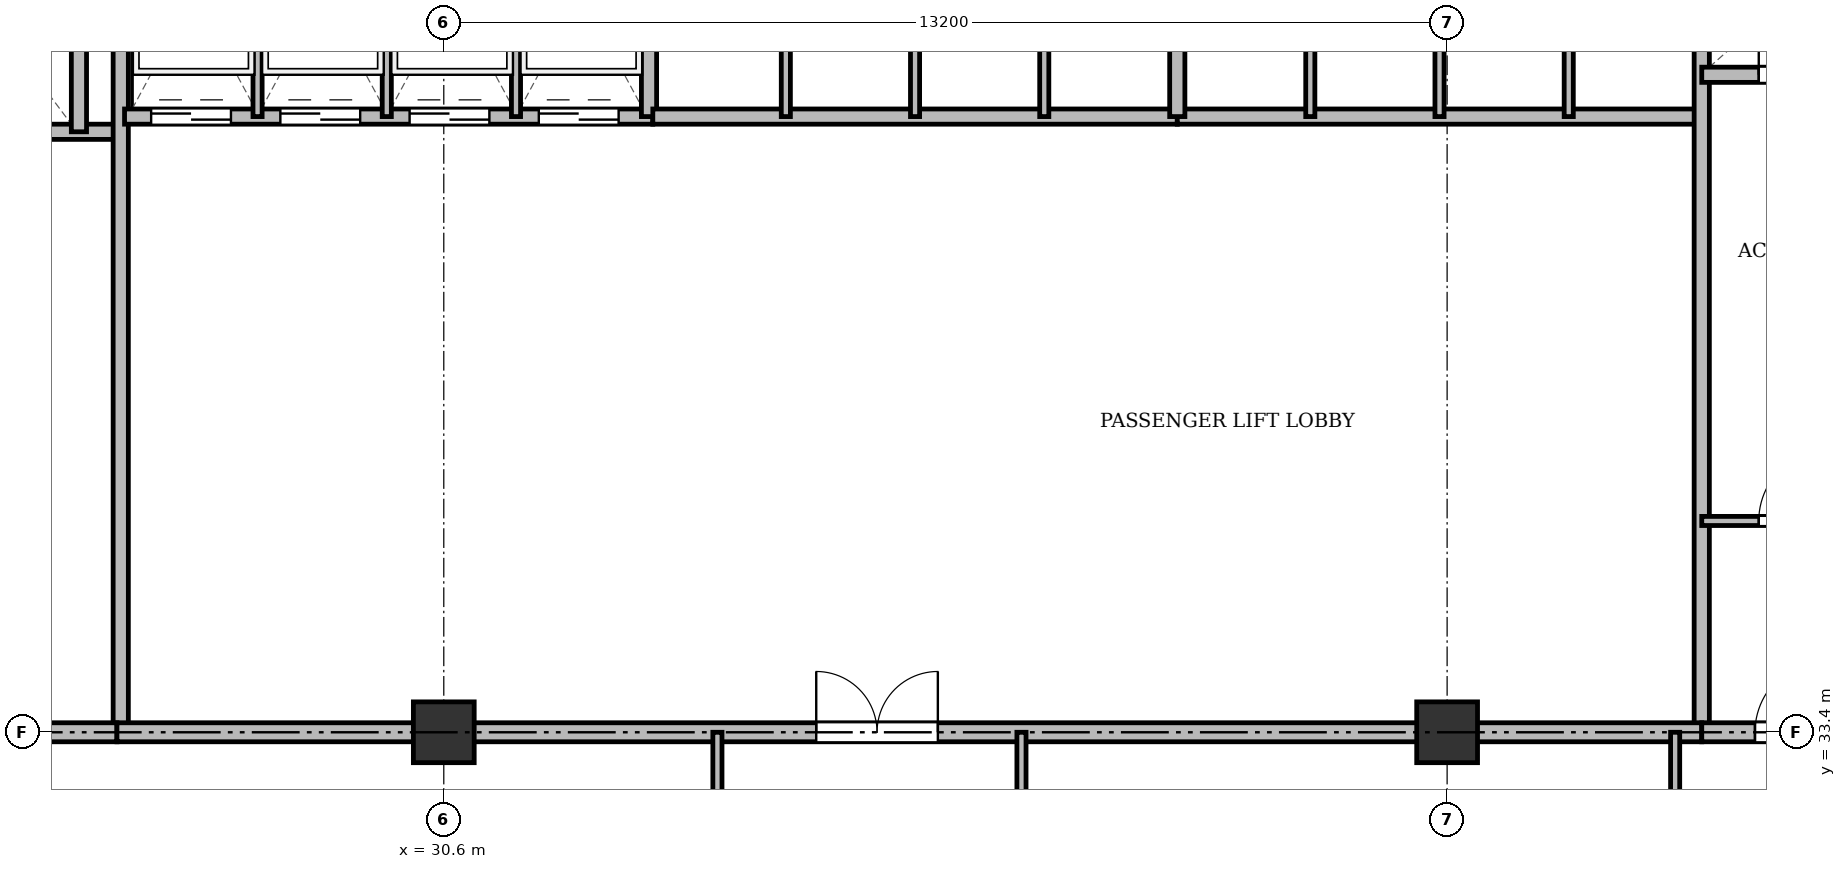
"""IFC4 building model, lengths in metres.
Left out: names, types, materials, properties, quantities, classifications, styles, units other than length and angle.
Written with IfcOpenShell. Run it as: python <this file> out.ifc"""

import sys

from ifc_helpers import new_model, si_unit, direction, frame, frame_2d, origin, origin_2d, place, context, subcontext, project, spatial, rectangle, extrude, source, transform, mapped, element, fill, save


model = new_model("IFC4")
c1 = context("Model", 3, precision=1e-05, world=origin(), true_north=direction((0.0, 1.0)))
c2 = subcontext(c1, "Body", "Model", "MODEL_VIEW")
j1 = project(units=[si_unit("LENGTHUNIT", "METRE"), si_unit("PLANEANGLEUNIT", "RADIAN")], contexts=[c1])
p1 = place(None, origin())
s1 = spatial("IfcSite", under=j1, at=p1, CompositionType="ELEMENT")
p2 = place(p1, origin())
s2 = spatial("IfcBuilding", under=s1, at=p2, CompositionType="ELEMENT")
p3 = place(p2, frame((0.0, 0.0, 114.1)))
s3 = spatial("IfcBuildingStorey", under=s2, at=p3, CompositionType="ELEMENT", Elevation=114.1)
m1 = source(origin(), c2, "Body", "SweptSolid", [
    extrude(rectangle(XDim=0.8, YDim=0.8, at=origin_2d()), origin(), (0.0, 0.0, 1.0), 3.6),
])
for number, where, z_axis, x_axis in (
    (1, (30.6, 33.4, 0.0), (0.0, 0.0, 1.0), (1.0, 0.0, 0.0)),
    (2, (43.8, 33.4, 0.0), (0.0, 0.0, 1.0), (1.0, 0.0, 0.0)),
):
    element("IfcColumn", number, at=place(p3, frame(where, z_axis=z_axis, x_axis=x_axis)), inside=s3, PredefinedType="COLUMN", context=c2, shape_type="MappedRepresentation", body=[
        mapped(m1, transform((0.0, 0.0, 0.0), x_axis=(1.0, 0.0, 0.0), y_axis=(0.0, 1.0, 0.0), z_axis=(0.0, 0.0, 1.0), scale=1.0)),
    ])
p4 = place(p3, frame((19.55, 41.3, 0.0), z_axis=(0.0, 0.0, 1.0), x_axis=(1.0, 0.0, 0.0)))
e3 = element("IfcWall", 3, at=p4, inside=s3, PredefinedType="SOLIDWALL", context=c2, shape_type="SweptSolid", body=[
    extrude(rectangle(XDim=6.75, YDim=0.2, at=frame_2d((3.375, 0.0))), origin(), (0.0, 0.0, 1.0), 3.34),
])
p5 = place(p4, frame((1.7, 0.0, 0.0)))
e4 = element("IfcOpeningElement", 4, at=p5, cuts=e3, PredefinedType="OPENING", context=c2, shape_type="SweptSolid", body=[
    extrude(rectangle(XDim=1.1, YDim=2.15, at=frame_2d((0.55, 1.075))), frame((0.0, 0.11, 0.0), z_axis=(0.0, -1.0, 0.0), x_axis=(1.0, 0.0, 0.0)), (0.0, 0.0, 1.0), 0.22),
])
p6 = place(p4, frame((4.4, 0.0, 0.0)))
e5 = element("IfcOpeningElement", 5, at=p6, cuts=e3, PredefinedType="OPENING", context=c2, shape_type="SweptSolid", body=[
    extrude(rectangle(XDim=1.1, YDim=2.15, at=frame_2d((0.55, 1.075))), frame((0.0, 0.11, 0.0), z_axis=(0.0, -1.0, 0.0), x_axis=(1.0, 0.0, 0.0)), (0.0, 0.0, 1.0), 0.22),
])
p7 = place(p3, frame((25.8, 41.3, 0.0), z_axis=(0.0, 0.0, 1.0), x_axis=(0.0, 1.0, 0.0)))
e6 = element("IfcWall", 6, at=p7, inside=s3, PredefinedType="SOLIDWALL", context=c2, shape_type="SweptSolid", body=[
    extrude(rectangle(XDim=3.4, YDim=0.2, at=frame_2d((1.7, 0.0))), origin(), (0.0, 0.0, 1.0), 3.34),
])
p8 = place(p3, frame((26.35, 33.4, 0.0), z_axis=(0.0, 0.0, 1.0), x_axis=(0.0, 1.0, 0.0)))
e7 = element("IfcWall", 7, at=p8, inside=s3, PredefinedType="SOLIDWALL", context=c2, shape_type="SweptSolid", body=[
    extrude(rectangle(XDim=11.3, YDim=0.2, at=frame_2d((5.65, 0.0))), origin(), (0.0, 0.0, 1.0), 2.752),
])
p9 = place(p3, frame((19.5, 33.4, 0.0), z_axis=(0.0, 0.0, 1.0), x_axis=(1.0, 0.0, 0.0)))
e8 = element("IfcWall", 8, at=p9, inside=s3, PredefinedType="PARTITIONING", context=c2, shape_type="SweptSolid", body=[
    extrude(rectangle(XDim=6.8, YDim=0.25, at=frame_2d((3.4, 0.0))), origin(), (0.0, 0.0, 1.0), 2.752),
])
p10 = place(p9, frame((0.75, 0.0, 0.0)))
e9 = element("IfcOpeningElement", 9, at=p10, cuts=e8, PredefinedType="OPENING", context=c2, shape_type="SweptSolid", body=[
    extrude(rectangle(XDim=1.6, YDim=2.2, at=frame_2d((0.8, 1.1))), frame((0.0, 0.135, 0.0), z_axis=(0.0, -1.0, 0.0), x_axis=(1.0, 0.0, 0.0)), (0.0, 0.0, 1.0), 0.27),
])
p11 = place(p3, frame((26.4, 41.5, 0.0), z_axis=(0.0, 0.0, 1.0), x_axis=(1.0, 0.0, 0.0)))
e10 = element("IfcWall", 10, at=p11, inside=s3, PredefinedType="SOLIDWALL", context=c2, shape_type="SweptSolid", body=[
    extrude(rectangle(XDim=6.95, YDim=0.2, at=frame_2d((3.475, 0.0))), origin(), (0.0, 0.0, 1.0), 3.34),
])
p12 = place(p11, frame((0.35, 0.0, 0.0)))
e11 = element("IfcOpeningElement", 11, at=p12, cuts=e10, PredefinedType="OPENING", context=c2, shape_type="SweptSolid", body=[
    extrude(rectangle(XDim=1.05, YDim=2.15, at=frame_2d((0.525, 1.075))), frame((0.0, 0.11, 0.0), z_axis=(0.0, -1.0, 0.0), x_axis=(1.0, 0.0, 0.0)), (0.0, 0.0, 1.0), 0.22),
])
p13 = place(p11, frame((2.05, 0.0, 0.0)))
e12 = element("IfcOpeningElement", 12, at=p13, cuts=e10, PredefinedType="OPENING", context=c2, shape_type="SweptSolid", body=[
    extrude(rectangle(XDim=1.05, YDim=2.15, at=frame_2d((0.525, 1.075))), frame((0.0, 0.11, 0.0), z_axis=(0.0, -1.0, 0.0), x_axis=(1.0, 0.0, 0.0)), (0.0, 0.0, 1.0), 0.22),
])
p14 = place(p11, frame((3.75, 0.0, 0.0)))
e13 = element("IfcOpeningElement", 13, at=p14, cuts=e10, PredefinedType="OPENING", context=c2, shape_type="SweptSolid", body=[
    extrude(rectangle(XDim=1.05, YDim=2.15, at=frame_2d((0.525, 1.075))), frame((0.0, 0.11, 0.0), z_axis=(0.0, -1.0, 0.0), x_axis=(1.0, 0.0, 0.0)), (0.0, 0.0, 1.0), 0.22),
])
p15 = place(p11, frame((5.45, 0.0, 0.0)))
e14 = element("IfcOpeningElement", 14, at=p15, cuts=e10, PredefinedType="OPENING", context=c2, shape_type="SweptSolid", body=[
    extrude(rectangle(XDim=1.05, YDim=2.15, at=frame_2d((0.525, 1.075))), frame((0.0, 0.11, 0.0), z_axis=(0.0, -1.0, 0.0), x_axis=(1.0, 0.0, 0.0)), (0.0, 0.0, 1.0), 0.22),
])
p16 = place(p3, frame((33.3, 41.5, 0.0), z_axis=(0.0, 0.0, 1.0), x_axis=(0.0, 1.0, 0.0)))
e15 = element("IfcWall", 15, at=p16, inside=s3, PredefinedType="SOLIDWALL", context=c2, shape_type="SweptSolid", body=[
    extrude(rectangle(XDim=3.2, YDim=0.2, at=frame_2d((1.6, 0.0))), origin(), (0.0, 0.0, 1.0), 3.34),
])
for number, where, z_axis, x_axis in (
    (16, (28.15, 41.5, 0.0), (0.0, 0.0, 1.0), (0.0, 1.0, 0.0)),
    (17, (29.85, 41.5, 0.0), (0.0, 0.0, 1.0), (0.0, 1.0, 0.0)),
    (18, (31.55, 41.5, 0.0), (0.0, 0.0, 1.0), (0.0, 1.0, 0.0)),
):
    element("IfcWall", number, at=place(p3, frame(where, z_axis=z_axis, x_axis=x_axis)), inside=s3, PredefinedType="PARTITIONING", context=c2, shape_type="SweptSolid", body=[
        extrude(rectangle(XDim=3.2, YDim=0.12, at=frame_2d((1.6, 0.0))), origin(), (0.0, 0.0, 1.0), 3.34),
    ])
p17 = place(p3, frame((33.35, 41.5, 0.0), z_axis=(0.0, 0.0, 1.0), x_axis=(1.0, 0.0, 0.0)))
e19 = element("IfcWall", 19, at=p17, inside=s3, PredefinedType="SOLIDWALL", context=c2, shape_type="SweptSolid", body=[
    extrude(rectangle(XDim=6.9, YDim=0.2, at=frame_2d((3.45, 0.0))), origin(), (0.0, 0.0, 1.0), 3.34),
])
for number, where, z_axis, x_axis in (
    (20, (35.1, 41.5, 0.0), (0.0, 0.0, 1.0), (0.0, 1.0, 0.0)),
    (21, (36.8, 41.5, 0.0), (0.0, 0.0, 1.0), (0.0, 1.0, 0.0)),
    (22, (38.5, 41.5, 0.0), (0.0, 0.0, 1.0), (0.0, 1.0, 0.0)),
):
    element("IfcWall", number, at=place(p3, frame(where, z_axis=z_axis, x_axis=x_axis)), inside=s3, PredefinedType="PARTITIONING", context=c2, shape_type="SweptSolid", body=[
        extrude(rectangle(XDim=3.2, YDim=0.12, at=frame_2d((1.6, 0.0))), origin(), (0.0, 0.0, 1.0), 3.34),
    ])
p18 = place(p3, frame((40.25, 41.5, 0.0), z_axis=(0.0, 0.0, 1.0), x_axis=(1.0, 0.0, 0.0)))
e23 = element("IfcWall", 23, at=p18, inside=s3, PredefinedType="SOLIDWALL", context=c2, shape_type="SweptSolid", body=[
    extrude(rectangle(XDim=6.9, YDim=0.2, at=frame_2d((3.45, 0.0))), origin(), (0.0, 0.0, 1.0), 2.84),
])
p19 = place(p3, frame((40.25, 41.5, 0.0), z_axis=(0.0, 0.0, 1.0), x_axis=(0.0, 1.0, 0.0)))
e24 = element("IfcWall", 24, at=p19, inside=s3, PredefinedType="SOLIDWALL", context=c2, shape_type="SweptSolid", body=[
    extrude(rectangle(XDim=3.2, YDim=0.2, at=frame_2d((1.6, 0.0))), origin(), (0.0, 0.0, 1.0), 3.34),
])
p20 = place(p3, frame((42.0, 41.5, 0.0), z_axis=(0.0, 0.0, 1.0), x_axis=(0.0, 1.0, 0.0)))
e25 = element("IfcWall", 25, at=p20, inside=s3, PredefinedType="PARTITIONING", context=c2, shape_type="SweptSolid", body=[
    extrude(rectangle(XDim=3.2, YDim=0.12, at=frame_2d((1.6, 0.0))), origin(), (0.0, 0.0, 1.0), 3.34),
])
p21 = place(p3, frame((43.7, 41.5, 0.0), z_axis=(0.0, 0.0, 1.0), x_axis=(0.0, 1.0, 0.0)))
e26 = element("IfcWall", 26, at=p21, inside=s3, PredefinedType="PARTITIONING", context=c2, shape_type="SweptSolid", body=[
    extrude(rectangle(XDim=3.2, YDim=0.12, at=frame_2d((1.6, 0.0))), origin(), (0.0, 0.0, 1.0), 2.84),
])
p22 = place(p3, frame((45.4, 41.5, 0.0), z_axis=(0.0, 0.0, 1.0), x_axis=(0.0, 1.0, 0.0)))
e27 = element("IfcWall", 27, at=p22, inside=s3, PredefinedType="PARTITIONING", context=c2, shape_type="SweptSolid", body=[
    extrude(rectangle(XDim=3.2, YDim=0.12, at=frame_2d((1.6, 0.0))), origin(), (0.0, 0.0, 1.0), 3.34),
])
p23 = place(p3, frame((47.15, 33.4, 0.0), z_axis=(0.0, 0.0, 1.0), x_axis=(0.0, 1.0, 0.0)))
e28 = element("IfcWall", 28, at=p23, inside=s3, PredefinedType="SOLIDWALL", context=c2, shape_type="SweptSolid", body=[
    extrude(rectangle(XDim=11.3, YDim=0.2, at=frame_2d((5.65, 0.0))), origin(), (0.0, 0.0, 1.0), 2.752),
])
p24 = place(p3, frame((26.3, 33.4, 0.0), z_axis=(0.0, 0.0, 1.0), x_axis=(1.0, 0.0, 0.0)))
e29 = element("IfcWall", 29, at=p24, inside=s3, PredefinedType="PARTITIONING", context=c2, shape_type="SweptSolid", body=[
    extrude(rectangle(XDim=20.85, YDim=0.25, at=frame_2d((10.425, 0.0))), origin(), (0.0, 0.0, 1.0), 2.752),
])
p25 = place(p24, frame((9.2, 0.0, 0.0)))
e30 = element("IfcOpeningElement", 30, at=p25, cuts=e29, PredefinedType="OPENING", context=c2, shape_type="SweptSolid", body=[
    extrude(rectangle(XDim=1.6, YDim=2.2, at=frame_2d((0.8, 1.1))), frame((0.0, 0.135, 0.0), z_axis=(0.0, -1.0, 0.0), x_axis=(1.0, 0.0, 0.0)), (0.0, 0.0, 1.0), 0.27),
])
p26 = place(p3, frame((47.15, 42.05, 0.0), z_axis=(0.0, 0.0, 1.0), x_axis=(1.0, 0.0, 0.0)))
e31 = element("IfcWall", 31, at=p26, inside=s3, PredefinedType="SOLIDWALL", context=c2, shape_type="SweptSolid", body=[
    extrude(rectangle(XDim=7.85, YDim=0.2, at=frame_2d((3.925, 0.0))), origin(), (0.0, 0.0, 1.0), 2.84),
])
p27 = place(p26, frame((0.75, 0.0, 0.0)))
e32 = element("IfcOpeningElement", 32, at=p27, cuts=e31, PredefinedType="OPENING", context=c2, shape_type="SweptSolid", body=[
    extrude(rectangle(XDim=0.9, YDim=2.1, at=frame_2d((0.45, 1.05))), frame((0.0, 0.11, 0.0), z_axis=(0.0, -1.0, 0.0), x_axis=(1.0, 0.0, 0.0)), (0.0, 0.0, 1.0), 0.22),
])
p28 = place(p26, frame((3.85, 0.0, 0.0)))
e33 = element("IfcOpeningElement", 33, at=p28, cuts=e31, PredefinedType="OPENING", context=c2, shape_type="SweptSolid", body=[
    extrude(rectangle(XDim=0.9, YDim=2.1, at=frame_2d((0.45, 1.05))), frame((0.0, 0.11, 0.0), z_axis=(0.0, -1.0, 0.0), x_axis=(1.0, 0.0, 0.0)), (0.0, 0.0, 1.0), 0.22),
])
p29 = place(p3, frame((47.15, 36.18, 0.0), z_axis=(0.0, 0.0, 1.0), x_axis=(1.0, 0.0, 0.0)))
e34 = element("IfcWall", 34, at=p29, inside=s3, PredefinedType="PARTITIONING", context=c2, shape_type="SweptSolid", body=[
    extrude(rectangle(XDim=5.3, YDim=0.12, at=frame_2d((2.65, 0.0))), origin(), (0.0, 0.0, 1.0), 2.84),
])
p30 = place(p29, frame((0.75, 0.0, 0.0)))
e35 = element("IfcOpeningElement", 35, at=p30, cuts=e34, PredefinedType="OPENING", context=c2, shape_type="SweptSolid", body=[
    extrude(rectangle(XDim=0.95, YDim=2.15, at=frame_2d((0.475, 1.075))), frame((0.0, 0.07, 0.0), z_axis=(0.0, -1.0, 0.0), x_axis=(1.0, 0.0, 0.0)), (0.0, 0.0, 1.0), 0.14),
])
p31 = place(p29, frame((3.45, 0.0, 0.0)))
e36 = element("IfcOpeningElement", 36, at=p31, cuts=e34, PredefinedType="OPENING", context=c2, shape_type="SweptSolid", body=[
    extrude(rectangle(XDim=0.95, YDim=2.15, at=frame_2d((0.475, 1.075))), frame((0.0, 0.07, 0.0), z_axis=(0.0, -1.0, 0.0), x_axis=(1.0, 0.0, 0.0)), (0.0, 0.0, 1.0), 0.14),
])
p32 = place(p3, frame((47.15, 33.4, 0.0), z_axis=(0.0, 0.0, 1.0), x_axis=(1.0, 0.0, 0.0)))
e37 = element("IfcWall", 37, at=p32, inside=s3, PredefinedType="PARTITIONING", context=c2, shape_type="SweptSolid", body=[
    extrude(rectangle(XDim=11.15, YDim=0.25, at=frame_2d((5.575, 0.0))), origin(), (0.0, 0.0, 1.0), 2.752),
])
p33 = place(p32, frame((0.7, 0.0, 0.0)))
e38 = element("IfcOpeningElement", 38, at=p33, cuts=e37, PredefinedType="OPENING", context=c2, shape_type="SweptSolid", body=[
    extrude(rectangle(XDim=0.95, YDim=2.15, at=frame_2d((0.475, 1.075))), frame((0.0, 0.135, 0.0), z_axis=(0.0, -1.0, 0.0), x_axis=(1.0, 0.0, 0.0)), (0.0, 0.0, 1.0), 0.27),
])
p34 = place(p32, frame((6.0, 0.0, 0.0)))
e39 = element("IfcOpeningElement", 39, at=p34, cuts=e37, PredefinedType="OPENING", context=c2, shape_type="SweptSolid", body=[
    extrude(rectangle(XDim=1.2, YDim=2.15, at=frame_2d((0.6, 1.075))), frame((0.0, 0.135, 0.0), z_axis=(0.0, -1.0, 0.0), x_axis=(1.0, 0.0, 0.0)), (0.0, 0.0, 1.0), 0.27),
])
for number, where, z_axis, x_axis in (
    (40, (34.2, 29.8, 0.0), (0.0, 0.0, 1.0), (0.0, 1.0, 0.0)),
    (41, (38.2, 29.8, 0.0), (0.0, 0.0, 1.0), (0.0, 1.0, 0.0)),
    (42, (46.8, 29.8, 0.0), (0.0, 0.0, 1.0), (0.0, 1.0, 0.0)),
):
    element("IfcWall", number, at=place(p3, frame(where, z_axis=z_axis, x_axis=x_axis)), inside=s3, PredefinedType="PARTITIONING", context=c2, shape_type="SweptSolid", body=[
        extrude(rectangle(XDim=3.6, YDim=0.12, at=frame_2d((1.8, 0.0))), origin(), (0.0, 0.0, 1.0), 2.752),
    ])
m2 = source(origin(), c2, "Body", "SweptSolid", [
    extrude(rectangle(XDim=1.05, YDim=2.15, at=frame_2d((0.525, 1.075))), frame((0.0, 0.025, 0.0), z_axis=(0.0, -1.0, 0.0), x_axis=(1.0, 0.0, 0.0)), (0.0, 0.0, 1.0), 0.05),
])
p35 = place(p12, origin())
e43 = element("IfcDoor", 43, at=p35, inside=s3, OperationType="DOUBLE_DOOR_SLIDING", PredefinedType="DOOR", context=c2, shape_type="MappedRepresentation", body=[
    mapped(m2, transform((0.0, 0.0, 0.0), x_axis=(1.0, 0.0, 0.0), y_axis=(0.0, 1.0, 0.0), z_axis=(0.0, 0.0, 1.0), scale=1.0)),
])
fill(e11, e43)
p36 = place(p13, origin())
e44 = element("IfcDoor", 44, at=p36, inside=s3, OperationType="DOUBLE_DOOR_SLIDING", PredefinedType="DOOR", context=c2, shape_type="MappedRepresentation", body=[
    mapped(m2, transform((0.0, 0.0, 0.0), x_axis=(1.0, 0.0, 0.0), y_axis=(0.0, 1.0, 0.0), z_axis=(0.0, 0.0, 1.0), scale=1.0)),
])
fill(e12, e44)
p37 = place(p14, origin())
e45 = element("IfcDoor", 45, at=p37, inside=s3, OperationType="DOUBLE_DOOR_SLIDING", PredefinedType="DOOR", context=c2, shape_type="MappedRepresentation", body=[
    mapped(m2, transform((0.0, 0.0, 0.0), x_axis=(1.0, 0.0, 0.0), y_axis=(0.0, 1.0, 0.0), z_axis=(0.0, 0.0, 1.0), scale=1.0)),
])
fill(e13, e45)
p38 = place(p15, origin())
e46 = element("IfcDoor", 46, at=p38, inside=s3, OperationType="DOUBLE_DOOR_SLIDING", PredefinedType="DOOR", context=c2, shape_type="MappedRepresentation", body=[
    mapped(m2, transform((0.0, 0.0, 0.0), x_axis=(1.0, 0.0, 0.0), y_axis=(0.0, 1.0, 0.0), z_axis=(0.0, 0.0, 1.0), scale=1.0)),
])
fill(e14, e46)
m3 = source(origin(), c2, "Body", "SweptSolid", [
    extrude(rectangle(XDim=1.6, YDim=2.2, at=frame_2d((0.8, 1.1))), frame((0.0, 0.025, 0.0), z_axis=(0.0, -1.0, 0.0), x_axis=(1.0, 0.0, 0.0)), (0.0, 0.0, 1.0), 0.05),
])
p39 = place(p25, origin())
e47 = element("IfcDoor", 47, at=p39, inside=s3, OperationType="DOUBLE_DOOR_SINGLE_SWING", PredefinedType="DOOR", context=c2, shape_type="MappedRepresentation", body=[
    mapped(m3, transform((0.0, 0.0, 0.0), x_axis=(1.0, 0.0, 0.0), y_axis=(0.0, 1.0, 0.0), z_axis=(0.0, 0.0, 1.0), scale=1.0)),
])
fill(e30, e47)
m4 = source(origin(), c2, "Body", "SweptSolid", [
    extrude(rectangle(XDim=0.9, YDim=2.1, at=frame_2d((0.45, 1.05))), frame((0.0, 0.025, 0.0), z_axis=(0.0, -1.0, 0.0), x_axis=(1.0, 0.0, 0.0)), (0.0, 0.0, 1.0), 0.05),
])
p40 = place(p27, origin())
e48 = element("IfcDoor", 48, at=p40, inside=s3, OperationType="SINGLE_SWING_LEFT", PredefinedType="DOOR", context=c2, shape_type="MappedRepresentation", body=[
    mapped(m4, transform((0.0, 0.0, 0.0), x_axis=(1.0, 0.0, 0.0), y_axis=(0.0, 1.0, 0.0), z_axis=(0.0, 0.0, 1.0), scale=1.0)),
])
fill(e32, e48)
m5 = source(origin(), c2, "Body", "SweptSolid", [
    extrude(rectangle(XDim=0.95, YDim=2.15, at=frame_2d((0.475, 1.075))), frame((0.0, 0.025, 0.0), z_axis=(0.0, -1.0, 0.0), x_axis=(1.0, 0.0, 0.0)), (0.0, 0.0, 1.0), 0.05),
])
p41 = place(p30, origin())
e49 = element("IfcDoor", 49, at=p41, inside=s3, OperationType="SINGLE_SWING_RIGHT", PredefinedType="DOOR", context=c2, shape_type="MappedRepresentation", body=[
    mapped(m5, transform((0.0, 0.0, 0.0), x_axis=(1.0, 0.0, 0.0), y_axis=(0.0, 1.0, 0.0), z_axis=(0.0, 0.0, 1.0), scale=1.0)),
])
fill(e35, e49)
p42 = place(p33, origin())
e50 = element("IfcDoor", 50, at=p42, inside=s3, OperationType="SINGLE_SWING_RIGHT", PredefinedType="DOOR", context=c2, shape_type="MappedRepresentation", body=[
    mapped(m5, transform((0.0, 0.0, 0.0), x_axis=(1.0, 0.0, 0.0), y_axis=(0.0, 1.0, 0.0), z_axis=(0.0, 0.0, 1.0), scale=1.0)),
])
fill(e38, e50)
save(model, sys.argv[1])
